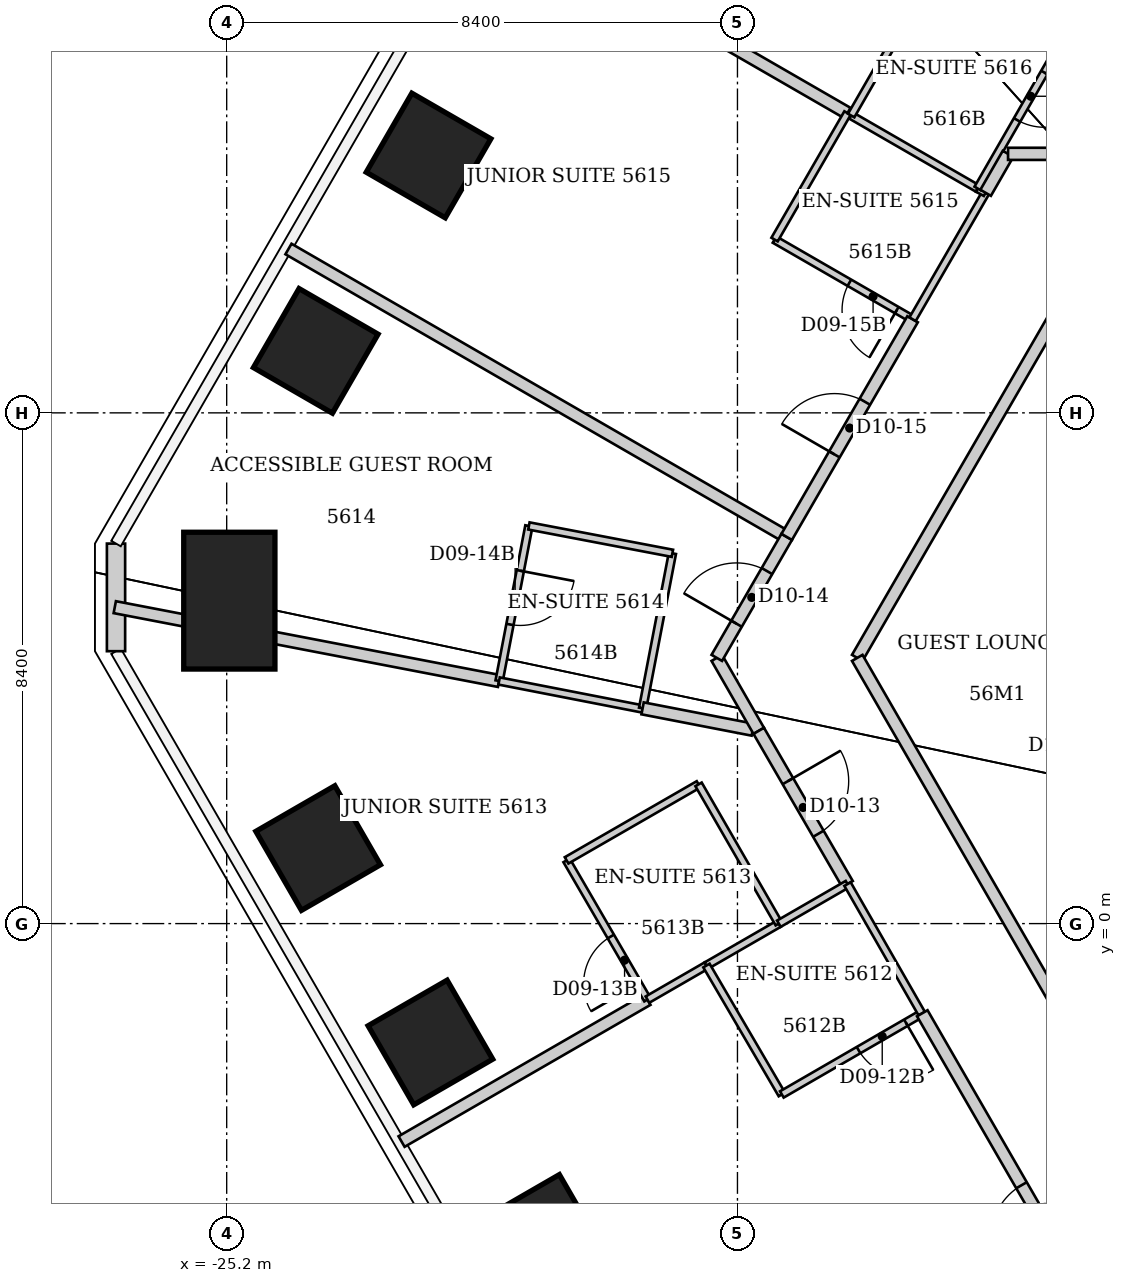
"""IFC4 building model, lengths in metres.
Left out: names, types, materials, properties, quantities, classifications, styles, units other than length and angle.
Written with IfcOpenShell. Run it as: python <this file> out.ifc"""

import sys

from ifc_helpers import new_model, si_unit, direction, frame, frame_2d, origin, origin_2d, place, context, subcontext, project, spatial, rectangle, extrude, element, fill, save


model = new_model("IFC4")
c1 = context("Model", 3, precision=1e-05, world=origin(), true_north=direction((0.0, 1.0)))
c2 = subcontext(c1, "Body", "Model", "MODEL_VIEW")
j1 = project(units=[si_unit("LENGTHUNIT", "METRE"), si_unit("PLANEANGLEUNIT", "RADIAN")], contexts=[c1])
p1 = place(None, origin())
s1 = spatial("IfcSite", under=j1, at=p1, CompositionType="ELEMENT")
p2 = place(p1, origin())
s2 = spatial("IfcBuilding", under=s1, at=p2, CompositionType="ELEMENT")
p3 = place(p2, frame((0.0, 0.0, 225.0)))
s3 = spatial("IfcBuildingStorey", under=s2, at=p3, CompositionType="ELEMENT", Elevation=225.0)
for number, where, z_axis, x_axis in (
    (1, (-20.003, -5.153, 0.0), (0.0, 0.0, 1.0), (-0.866, -0.5, 0.0)),
    (2, (-21.85, -1.956, 0.0), (0.0, 0.0, 1.0), (-0.866, -0.5, 0.0)),
    (3, (-23.696, 1.242, 0.0), (0.0, 0.0, 1.0), (-0.866, -0.5, 0.0)),
):
    element("IfcColumn", number, at=place(p3, frame(where, z_axis=z_axis, x_axis=x_axis)), inside=s3, PredefinedType="COLUMN", context=c2, shape_type="SweptSolid", body=[
        extrude(rectangle(XDim=1.5, YDim=1.5, at=origin_2d()), origin(), (0.0, 0.0, 1.0), 3.8),
    ])
p4 = place(p3, frame((-25.156, 5.311, 0.0), z_axis=(0.0, 0.0, 1.0), x_axis=(-1.0, 0.0, 0.0)))
e4 = element("IfcColumn", 4, at=p4, inside=s3, PredefinedType="COLUMN", context=c2, shape_type="SweptSolid", body=[
    extrude(rectangle(XDim=1.5, YDim=2.25, at=origin_2d()), origin(), (0.0, 0.0, 1.0), 3.8),
])
for number, where, z_axis, x_axis in (
    (5, (-23.735, 9.419, 0.0), (0.0, 0.0, 1.0), (-0.866, 0.5, 0.0)),
    (6, (-21.88, 12.633, 0.0), (0.0, 0.0, 1.0), (-0.866, 0.5, 0.0)),
):
    element("IfcColumn", number, at=place(p3, frame(where, z_axis=z_axis, x_axis=x_axis)), inside=s3, PredefinedType="COLUMN", context=c2, shape_type="SweptSolid", body=[
        extrude(rectangle(XDim=1.5, YDim=1.5, at=origin_2d()), origin(), (0.0, 0.0, 1.0), 3.8),
    ])
p5 = place(p3, frame((-27.02, 4.48, 0.0), z_axis=(0.0, 0.0, 1.0), x_axis=(0.0, 1.0, 0.0)))
e7 = element("IfcWall", 7, at=p5, inside=s3, PredefinedType="SOLIDWALL", context=c2, shape_type="SweptSolid", body=[
    extrude(rectangle(XDim=1.77, YDim=0.3, at=frame_2d((0.885, 0.0))), origin(), (0.0, 0.0, 1.0), 3.64),
])
p6 = place(p3, frame((-27.041, 5.204, 0.0), z_axis=(0.0, 0.0, 1.0), x_axis=(0.98203917013, -0.188677153703, 0.0)))
e8 = element("IfcWall", 8, at=p6, inside=s3, PredefinedType="PARTITIONING", context=c2, shape_type="SweptSolid", body=[
    extrude(rectangle(XDim=6.436, YDim=0.2, at=frame_2d((3.218, 0.0))), origin(), (0.0, 0.0, 1.0), 3.64),
])
p7 = place(p3, frame((-24.184, 11.095, 0.0), z_axis=(0.0, 0.0, 1.0), x_axis=(0.865833251631, -0.500332669702, 0.0)))
e9 = element("IfcWall", 9, at=p7, inside=s3, PredefinedType="PARTITIONING", context=c2, shape_type="SweptSolid", body=[
    extrude(rectangle(XDim=9.454, YDim=0.2, at=frame_2d((4.727, 0.0))), origin(), (0.0, 0.0, 1.0), 3.64),
])
p8 = place(p3, frame((-22.324, -3.585, 0.0), z_axis=(0.0, 0.0, 1.0), x_axis=(0.86600796803, 0.500030198396, 0.0)))
e10 = element("IfcWall", 10, at=p8, inside=s3, PredefinedType="PARTITIONING", context=c2, shape_type="SweptSolid", body=[
    extrude(rectangle(XDim=4.67, YDim=0.2, at=frame_2d((2.335, 0.0))), origin(), (0.0, 0.0, 1.0), 3.64),
])
p9 = place(p3, frame((-20.846, 16.71, 0.0), z_axis=(0.0, 0.0, 1.0), x_axis=(0.866102018567, -0.499867275818, 0.0)))
e11 = element("IfcWall", 11, at=p9, inside=s3, PredefinedType="PARTITIONING", context=c2, shape_type="SweptSolid", body=[
    extrude(rectangle(XDim=6.761, YDim=0.2, at=frame_2d((3.381, 0.0))), origin(), (0.0, 0.0, 1.0), 3.64),
])
p10 = place(p3, frame((-20.23, 6.54, 0.0), z_axis=(0.0, 0.0, 1.0), x_axis=(-0.188697442844, -0.982035271802, 0.0)))
e12 = element("IfcWall", 12, at=p10, inside=s3, PredefinedType="PARTITIONING", context=c2, shape_type="SweptSolid", body=[
    extrude(rectangle(XDim=2.597, YDim=0.12, at=frame_2d((1.298, 0.0))), origin(), (0.0, 0.0, 1.0), 3.64),
])
p11 = place(p10, frame((0.75, 0.0, 0.0)))
e13 = element("IfcOpeningElement", 13, at=p11, cuts=e12, PredefinedType="OPENING", context=c2, shape_type="SweptSolid", body=[
    extrude(rectangle(XDim=0.9, YDim=2.03, at=frame_2d((0.45, 1.015))), frame((0.0, 0.06, 0.0), z_axis=(0.0, -1.0, 0.0), x_axis=(1.0, 0.0, 0.0)), (0.0, 0.0, 1.0), 0.12),
])
p12 = place(p3, frame((-19.61, 1.04, 0.0), z_axis=(0.0, 0.0, 1.0), x_axis=(0.502242265546, -0.864726954997, 0.0)))
e14 = element("IfcWall", 14, at=p12, inside=s3, PredefinedType="PARTITIONING", context=c2, shape_type="SweptSolid", body=[
    extrude(rectangle(XDim=2.648, YDim=0.12, at=frame_2d((1.324, 0.0))), origin(), (0.0, 0.0, 1.0), 3.64),
])
p13 = place(p12, frame((1.448, 0.0, 0.0)))
e15 = element("IfcOpeningElement", 15, at=p13, cuts=e14, PredefinedType="OPENING", context=c2, shape_type="SweptSolid", body=[
    extrude(rectangle(XDim=0.9, YDim=2.03, at=frame_2d((0.45, 1.015))), frame((0.0, 0.06, 0.0), z_axis=(0.0, -1.0, 0.0), x_axis=(1.0, 0.0, 0.0)), (0.0, 0.0, 1.0), 0.12),
])
p14 = place(p3, frame((-18.36, 3.53, 0.0), z_axis=(0.0, 0.0, 1.0), x_axis=(-0.981529676402, 0.191309943135, 0.0)))
e16 = element("IfcWall", 16, at=p14, inside=s3, PredefinedType="PARTITIONING", context=c2, shape_type="SweptSolid", body=[
    extrude(rectangle(XDim=2.404, YDim=0.12, at=frame_2d((1.202, 0.0))), origin(), (0.0, 0.0, 1.0), 3.64),
])
p15 = place(p3, frame((-18.36, 3.54, 0.0), z_axis=(0.0, 0.0, 1.0), x_axis=(0.188788112352, 0.982017845375, 0.0)))
e17 = element("IfcWall", 17, at=p15, inside=s3, PredefinedType="PARTITIONING", context=c2, shape_type="SweptSolid", body=[
    extrude(rectangle(XDim=2.597, YDim=0.12, at=frame_2d((1.298, 0.0))), origin(), (0.0, 0.0, 1.0), 3.64),
])
p16 = place(p3, frame((-18.36, 3.54, 0.0), z_axis=(0.0, 0.0, 1.0), x_axis=(0.981743214677, -0.190211094409, 0.0)))
e18 = element("IfcWall", 18, at=p16, inside=s3, PredefinedType="PARTITIONING", context=c2, shape_type="SweptSolid", body=[
    extrude(rectangle(XDim=1.846, YDim=0.2, at=frame_2d((0.923, 0.0))), origin(), (0.0, 0.0, 1.0), 3.64),
])
p17 = place(p3, frame((-18.28, -1.25, 0.0), z_axis=(0.0, 0.0, 1.0), x_axis=(0.866007717299, 0.500030632641, 0.0)))
e19 = element("IfcWall", 19, at=p17, inside=s3, PredefinedType="PARTITIONING", context=c2, shape_type="SweptSolid", body=[
    extrude(rectangle(XDim=1.12, YDim=0.12, at=frame_2d((0.56, 0.0))), origin(), (0.0, 0.0, 1.0), 3.64),
])
p18 = place(p3, frame((-17.87, 6.09, 0.0), z_axis=(0.0, 0.0, 1.0), x_axis=(-0.982303859288, 0.187294228499, 0.0)))
e20 = element("IfcWall", 20, at=p18, inside=s3, PredefinedType="PARTITIONING", context=c2, shape_type="SweptSolid", body=[
    extrude(rectangle(XDim=2.402, YDim=0.12, at=frame_2d((1.201, 0.0))), origin(), (0.0, 0.0, 1.0), 3.64),
])
p19 = place(p3, frame((-17.44, 2.29, 0.0), z_axis=(0.0, 0.0, 1.0), x_axis=(-0.86653430447, -0.499117520406, 0.0)))
e21 = element("IfcWall", 21, at=p19, inside=s3, PredefinedType="PARTITIONING", context=c2, shape_type="SweptSolid", body=[
    extrude(rectangle(XDim=2.504, YDim=0.12, at=frame_2d((1.252, 0.0))), origin(), (0.0, 0.0, 1.0), 3.64),
])
p20 = place(p3, frame((-17.31, -0.69, 0.0), z_axis=(0.0, 0.0, 1.0), x_axis=(0.865940235891, 0.500147486112, 0.0)))
e22 = element("IfcWall", 22, at=p20, inside=s3, PredefinedType="PARTITIONING", context=c2, shape_type="SweptSolid", body=[
    extrude(rectangle(XDim=1.375, YDim=0.12, at=frame_2d((0.688, 0.0))), origin(), (0.0, 0.0, 1.0), 3.64),
])
p21 = place(p3, frame((-17.31, -0.69, 0.0), z_axis=(0.0, 0.0, 1.0), x_axis=(0.50485955871, -0.863201497901, 0.0)))
e23 = element("IfcWall", 23, at=p21, inside=s3, PredefinedType="PARTITIONING", context=c2, shape_type="SweptSolid", body=[
    extrude(rectangle(XDim=2.456, YDim=0.12, at=frame_2d((1.228, 0.0))), origin(), (0.0, 0.0, 1.0), 3.64),
])
p22 = place(p3, frame((-17.14, 4.37, 0.0), z_axis=(0.0, 0.0, 1.0), x_axis=(0.498378346744, -0.866959643522, 0.0)))
e24 = element("IfcWall", 24, at=p22, inside=s3, PredefinedType="PARTITIONING", context=c2, shape_type="SweptSolid", body=[
    extrude(rectangle(XDim=1.384, YDim=0.2, at=frame_2d((0.692, 0.0))), origin(), (0.0, 0.0, 1.0), 3.64),
])
p23 = place(p3, frame((-17.14, 4.37, 0.0), z_axis=(0.0, 0.0, 1.0), x_axis=(0.500320071569, 0.865840531498, 0.0)))
e25 = element("IfcWall", 25, at=p23, inside=s3, PredefinedType="PARTITIONING", context=c2, shape_type="SweptSolid", body=[
    extrude(rectangle(XDim=2.298, YDim=0.2, at=frame_2d((1.149, 0.0))), origin(), (0.0, 0.0, 1.0), 3.64),
])
p24 = place(p23, frame((0.649, 0.0, 0.0)))
e26 = element("IfcOpeningElement", 26, at=p24, cuts=e25, PredefinedType="OPENING", context=c2, shape_type="SweptSolid", body=[
    extrude(rectangle(XDim=1.0, YDim=2.13, at=frame_2d((0.5, 1.065))), frame((0.0, 0.1, 0.0), z_axis=(0.0, -1.0, 0.0), x_axis=(1.0, 0.0, 0.0)), (0.0, 0.0, 1.0), 0.2),
])
p25 = place(p3, frame((-16.45, 3.17, 0.0), z_axis=(0.0, 0.0, 1.0), x_axis=(0.501293994647, -0.865277025542, 0.0)))
e27 = element("IfcWall", 27, at=p25, inside=s3, PredefinedType="PARTITIONING", context=c2, shape_type="SweptSolid", body=[
    extrude(rectangle(XDim=2.912, YDim=0.2, at=frame_2d((1.456, 0.0))), origin(), (0.0, 0.0, 1.0), 3.64),
])
p26 = place(p25, frame((0.956, 0.0, 0.0)))
e28 = element("IfcOpeningElement", 28, at=p26, cuts=e27, PredefinedType="OPENING", context=c2, shape_type="SweptSolid", body=[
    extrude(rectangle(XDim=1.0, YDim=2.13, at=frame_2d((0.5, 1.065))), frame((0.0, 0.1, 0.0), z_axis=(0.0, -1.0, 0.0), x_axis=(1.0, 0.0, 0.0)), (0.0, 0.0, 1.0), 0.2),
])
p27 = place(p3, frame((-16.19, 11.25, 0.0), z_axis=(0.0, 0.0, 1.0), x_axis=(0.866114241029, -0.499846097802, 0.0)))
e29 = element("IfcWall", 29, at=p27, inside=s3, PredefinedType="PARTITIONING", context=c2, shape_type="SweptSolid", body=[
    extrude(rectangle(XDim=2.621, YDim=0.12, at=frame_2d((1.311, 0.0))), origin(), (0.0, 0.0, 1.0), 3.64),
])
p28 = place(p27, frame((1.421, 0.0, 0.0)))
e30 = element("IfcOpeningElement", 30, at=p28, cuts=e29, PredefinedType="OPENING", context=c2, shape_type="SweptSolid", body=[
    extrude(rectangle(XDim=0.9, YDim=2.03, at=frame_2d((0.45, 1.015))), frame((0.0, 0.06, 0.0), z_axis=(0.0, -1.0, 0.0), x_axis=(1.0, 0.0, 0.0)), (0.0, 0.0, 1.0), 0.12),
])
p29 = place(p3, frame((-16.12, 0.0, 0.0), z_axis=(0.0, 0.0, 1.0), x_axis=(-0.499338582192, 0.866406936915, 0.0)))
e31 = element("IfcWall", 31, at=p29, inside=s3, PredefinedType="PARTITIONING", context=c2, shape_type="SweptSolid", body=[
    extrude(rectangle(XDim=2.643, YDim=0.12, at=frame_2d((1.322, 0.0))), origin(), (0.0, 0.0, 1.0), 3.64),
])
p30 = place(p3, frame((-16.119, -0.002, 0.0), z_axis=(0.0, 0.0, 1.0), x_axis=(0.865998449813, 0.500046682742, 0.0)))
e32 = element("IfcWall", 32, at=p30, inside=s3, PredefinedType="PARTITIONING", context=c2, shape_type="SweptSolid", body=[
    extrude(rectangle(XDim=1.304, YDim=0.12, at=frame_2d((0.652, 0.0))), origin(), (0.0, 0.0, 1.0), 3.64),
])
p31 = place(p3, frame((-16.07, -2.81, 0.0), z_axis=(0.0, 0.0, 1.0), x_axis=(0.865675724273, 0.500605174168, 0.0)))
e33 = element("IfcWall", 33, at=p31, inside=s3, PredefinedType="PARTITIONING", context=c2, shape_type="SweptSolid", body=[
    extrude(rectangle(XDim=2.657, YDim=0.12, at=frame_2d((1.329, 0.0))), origin(), (0.0, 0.0, 1.0), 3.023),
])
p32 = place(p31, frame((1.457, 0.0, 0.0)))
e34 = element("IfcOpeningElement", 34, at=p32, cuts=e33, PredefinedType="OPENING", context=c2, shape_type="SweptSolid", body=[
    extrude(rectangle(XDim=0.9, YDim=2.03, at=frame_2d((0.45, 1.015))), frame((0.0, 0.06, 0.0), z_axis=(0.0, -1.0, 0.0), x_axis=(1.0, 0.0, 0.0)), (0.0, 0.0, 1.0), 0.12),
])
p33 = place(p3, frame((-15.99, 6.36, 0.0), z_axis=(0.0, 0.0, 1.0), x_axis=(0.500589371231, 0.865684862644, 0.0)))
e35 = element("IfcWall", 35, at=p33, inside=s3, PredefinedType="PARTITIONING", context=c2, shape_type="SweptSolid", body=[
    extrude(rectangle(XDim=4.135, YDim=0.2, at=frame_2d((2.068, 0.0))), origin(), (0.0, 0.0, 1.0), 3.64),
])
p34 = place(p33, frame((1.568, 0.0, 0.0)))
e36 = element("IfcOpeningElement", 36, at=p34, cuts=e35, PredefinedType="OPENING", context=c2, shape_type="SweptSolid", body=[
    extrude(rectangle(XDim=1.0, YDim=2.13, at=frame_2d((0.5, 1.065))), frame((0.0, 0.1, 0.0), z_axis=(0.0, -1.0, 0.0), x_axis=(1.0, 0.0, 0.0)), (0.0, 0.0, 1.0), 0.2),
])
p35 = place(p3, frame((-14.99, 0.65, 0.0), z_axis=(0.0, 0.0, 1.0), x_axis=(0.497027744361, -0.86773464915, 0.0)))
e37 = element("IfcWall", 37, at=p35, inside=s3, PredefinedType="PARTITIONING", context=c2, shape_type="SweptSolid", body=[
    extrude(rectangle(XDim=2.455, YDim=0.12, at=frame_2d((1.227, 0.0))), origin(), (0.0, 0.0, 1.0), 3.64),
])
p36 = place(p3, frame((-14.99, 13.33, 0.0), z_axis=(0.0, 0.0, 1.0), x_axis=(-0.499693115345, -0.866202511239, 0.0)))
e38 = element("IfcWall", 38, at=p36, inside=s3, PredefinedType="PARTITIONING", context=c2, shape_type="SweptSolid", body=[
    extrude(rectangle(XDim=2.401, YDim=0.12, at=frame_2d((1.201, 0.0))), origin(), (0.0, 0.0, 1.0), 3.64),
])
p37 = place(p3, frame((-14.93, 13.29, 0.0), z_axis=(0.0, 0.0, 1.0), x_axis=(0.866177122335, -0.499737123639, 0.0)))
e39 = element("IfcWall", 39, at=p37, inside=s3, PredefinedType="PARTITIONING", context=c2, shape_type="SweptSolid", body=[
    extrude(rectangle(XDim=2.401, YDim=0.12, at=frame_2d((1.201, 0.0))), origin(), (0.0, 0.0, 1.0), 3.64),
])
p38 = place(p3, frame((-14.83, 4.37, 0.0), z_axis=(0.0, 0.0, 1.0), x_axis=(0.500899863475, 0.865505243642, 0.0)))
e40 = element("IfcWall", 40, at=p38, inside=s3, PredefinedType="PARTITIONING", context=c2, shape_type="SweptSolid", body=[
    extrude(rectangle(XDim=7.267, YDim=0.2, at=frame_2d((3.634, 0.0))), origin(), (0.0, 0.0, 1.0), 3.64),
])
p39 = place(p3, frame((-13.92, 9.94, 0.0), z_axis=(0.0, 0.0, 1.0), x_axis=(0.500402934999, 0.865792644139, 0.0)))
e41 = element("IfcWall", 41, at=p39, inside=s3, PredefinedType="PARTITIONING", context=c2, shape_type="SweptSolid", body=[
    extrude(rectangle(XDim=2.401, YDim=0.12, at=frame_2d((1.201, 0.0))), origin(), (0.0, 0.0, 1.0), 3.64),
])
p40 = place(p3, frame((-13.63, 15.55, 0.0), z_axis=(0.0, 0.0, 1.0), x_axis=(-0.498627694264, -0.866816256489, 0.0)))
e42 = element("IfcWall", 42, at=p40, inside=s3, PredefinedType="PARTITIONING", context=c2, shape_type="SweptSolid", body=[
    extrude(rectangle(XDim=2.607, YDim=0.12, at=frame_2d((1.304, 0.0))), origin(), (0.0, 0.0, 1.0), 3.64),
])
p41 = place(p3, frame((-12.85, 12.09, 0.0), z_axis=(0.0, 0.0, 1.0), x_axis=(0.880471099922, -0.474099823035, 0.0)))
e43 = element("IfcWall", 43, at=p41, inside=s3, PredefinedType="PARTITIONING", context=c2, shape_type="SweptSolid", body=[
    extrude(rectangle(XDim=0.148, YDim=0.12, at=frame_2d((0.074, 0.0))), origin(), (0.0, 0.0, 1.0), 3.64),
])
p42 = place(p3, frame((-12.85, 12.09, 0.0), z_axis=(0.0, 0.0, 1.0), x_axis=(0.498627694264, 0.866816256489, 0.0)))
e44 = element("IfcWall", 44, at=p42, inside=s3, PredefinedType="PARTITIONING", context=c2, shape_type="SweptSolid", body=[
    extrude(rectangle(XDim=2.607, YDim=0.12, at=frame_2d((1.304, 0.0))), origin(), (0.0, 0.0, 1.0), 3.64),
])
p43 = place(p42, frame((1.3, 0.0, 0.0)))
e45 = element("IfcOpeningElement", 45, at=p43, cuts=e44, PredefinedType="OPENING", context=c2, shape_type="SweptSolid", body=[
    extrude(rectangle(XDim=0.9, YDim=2.03, at=frame_2d((0.45, 1.015))), frame((0.0, 0.06, 0.0), z_axis=(0.0, -1.0, 0.0), x_axis=(1.0, 0.0, 0.0)), (0.0, 0.0, 1.0), 0.12),
])
p44 = place(p3, frame((-12.718, 12.019, 0.0), z_axis=(0.0, 0.0, 1.0), x_axis=(0.498129744856, 0.867102506795, 0.0)))
e46 = element("IfcWall", 46, at=p44, inside=s3, PredefinedType="PARTITIONING", context=c2, shape_type="SweptSolid", body=[
    extrude(rectangle(XDim=0.739, YDim=0.2, at=frame_2d((0.37, 0.0))), origin(), (0.0, 0.0, 1.0), 3.64),
])
p45 = place(p3, frame((-11.55, 14.35, 0.0), z_axis=(0.0, 0.0, 1.0), x_axis=(-0.866177122335, 0.499737123639, 0.0)))
e47 = element("IfcWall", 47, at=p45, inside=s3, PredefinedType="PARTITIONING", context=c2, shape_type="SweptSolid", body=[
    extrude(rectangle(XDim=2.401, YDim=0.12, at=frame_2d((1.201, 0.0))), origin(), (0.0, 0.0, 1.0), 3.64),
])
p46 = place(p3, frame((-10.647, -2.881, 0.0), z_axis=(0.0, 0.0, 1.0), x_axis=(-0.499665221769, 0.866218601829, 0.0)))
e48 = element("IfcWall", 48, at=p46, inside=s3, PredefinedType="PARTITIONING", context=c2, shape_type="SweptSolid", body=[
    extrude(rectangle(XDim=8.371, YDim=0.2, at=frame_2d((4.186, 0.0))), origin(), (0.0, 0.0, 1.0), 3.64),
])
p47 = place(p3, frame((-9.997, -7.998, 0.0), z_axis=(0.0, 0.0, 1.0), x_axis=(-0.499699067435, 0.866199077582, 0.0)))
e49 = element("IfcWall", 49, at=p47, inside=s3, PredefinedType="PARTITIONING", context=c2, shape_type="SweptSolid", body=[
    extrude(rectangle(XDim=7.531, YDim=0.2, at=frame_2d((3.766, 0.0))), origin(), (0.0, 0.0, 1.0), 3.64),
])
p48 = place(p47, frame((3.266, 0.0, 0.0)))
e50 = element("IfcOpeningElement", 50, at=p48, cuts=e49, PredefinedType="OPENING", context=c2, shape_type="SweptSolid", body=[
    extrude(rectangle(XDim=1.0, YDim=2.13, at=frame_2d((0.5, 1.065))), frame((0.0, 0.1, 0.0), z_axis=(0.0, -1.0, 0.0), x_axis=(1.0, 0.0, 0.0)), (0.0, 0.0, 1.0), 0.2),
])
p49 = place(p3, frame((-9.66, 12.66, 0.0), z_axis=(0.0, 0.0, 1.0), x_axis=(-1.0, 0.0, 0.0)))
e51 = element("IfcWall", 51, at=p49, inside=s3, PredefinedType="PARTITIONING", context=c2, shape_type="SweptSolid", body=[
    extrude(rectangle(XDim=2.69, YDim=0.2, at=frame_2d((1.345, 0.0))), origin(), (0.0, 0.0, 1.0), 3.64),
])
p50 = place(p49, frame((0.845, 0.0, 0.0)))
e52 = element("IfcOpeningElement", 52, at=p50, cuts=e51, PredefinedType="OPENING", context=c2, shape_type="SweptSolid", body=[
    extrude(rectangle(XDim=1.0, YDim=2.13, at=frame_2d((0.5, 1.065))), frame((0.0, 0.1, 0.0), z_axis=(0.0, -1.0, 0.0), x_axis=(1.0, 0.0, 0.0)), (0.0, 0.0, 1.0), 0.2),
])
p51 = place(p48, origin())
e53 = element("IfcDoor", 53, at=p51, inside=s3, OperationType="SINGLE_SWING_LEFT", PredefinedType="DOOR", context=c2, shape_type="SweptSolid", body=[
    extrude(rectangle(XDim=1.0, YDim=2.13, at=frame_2d((0.5, 1.065))), frame((0.0, 0.025, 0.0), z_axis=(0.0, -1.0, 0.0), x_axis=(1.0, 0.0, 0.0)), (0.0, 0.0, 1.0), 0.05),
])
fill(e50, e53)
p52 = place(p32, origin())
e54 = element("IfcDoor", 54, at=p52, inside=s3, OperationType="SINGLE_SWING_RIGHT", PredefinedType="DOOR", context=c2, shape_type="SweptSolid", body=[
    extrude(rectangle(XDim=0.9, YDim=2.03, at=frame_2d((0.45, 1.015))), frame((0.0, 0.025, 0.0), z_axis=(0.0, -1.0, 0.0), x_axis=(1.0, 0.0, 0.0)), (0.0, 0.0, 1.0), 0.05),
])
fill(e34, e54)
p53 = place(p26, origin())
e55 = element("IfcDoor", 55, at=p53, inside=s3, OperationType="SINGLE_SWING_LEFT", PredefinedType="DOOR", context=c2, shape_type="SweptSolid", body=[
    extrude(rectangle(XDim=1.0, YDim=2.13, at=frame_2d((0.5, 1.065))), frame((0.0, 0.025, 0.0), z_axis=(0.0, -1.0, 0.0), x_axis=(1.0, 0.0, 0.0)), (0.0, 0.0, 1.0), 0.05),
])
fill(e28, e55)
p54 = place(p13, origin())
e56 = element("IfcDoor", 56, at=p54, inside=s3, OperationType="SINGLE_SWING_RIGHT", PredefinedType="DOOR", context=c2, shape_type="SweptSolid", body=[
    extrude(rectangle(XDim=0.9, YDim=2.03, at=frame_2d((0.45, 1.015))), frame((0.0, 0.025, 0.0), z_axis=(0.0, -1.0, 0.0), x_axis=(1.0, 0.0, 0.0)), (0.0, 0.0, 1.0), 0.05),
])
fill(e15, e56)
p55 = place(p24, origin())
e57 = element("IfcDoor", 57, at=p55, inside=s3, OperationType="SINGLE_SWING_LEFT", PredefinedType="DOOR", context=c2, shape_type="SweptSolid", body=[
    extrude(rectangle(XDim=1.0, YDim=2.13, at=frame_2d((0.5, 1.065))), frame((0.0, 0.025, 0.0), z_axis=(0.0, -1.0, 0.0), x_axis=(1.0, 0.0, 0.0)), (0.0, 0.0, 1.0), 0.05),
])
fill(e26, e57)
p56 = place(p11, origin())
e58 = element("IfcDoor", 58, at=p56, inside=s3, OperationType="SINGLE_SWING_LEFT", PredefinedType="DOOR", context=c2, shape_type="SweptSolid", body=[
    extrude(rectangle(XDim=0.9, YDim=2.03, at=frame_2d((0.45, 1.015))), frame((0.0, 0.025, 0.0), z_axis=(0.0, -1.0, 0.0), x_axis=(1.0, 0.0, 0.0)), (0.0, 0.0, 1.0), 0.05),
])
fill(e13, e58)
p57 = place(p34, origin())
e59 = element("IfcDoor", 59, at=p57, inside=s3, OperationType="SINGLE_SWING_LEFT", PredefinedType="DOOR", context=c2, shape_type="SweptSolid", body=[
    extrude(rectangle(XDim=1.0, YDim=2.13, at=frame_2d((0.5, 1.065))), frame((0.0, 0.025, 0.0), z_axis=(0.0, -1.0, 0.0), x_axis=(1.0, 0.0, 0.0)), (0.0, 0.0, 1.0), 0.05),
])
fill(e36, e59)
p58 = place(p28, origin())
e60 = element("IfcDoor", 60, at=p58, inside=s3, OperationType="SINGLE_SWING_RIGHT", PredefinedType="DOOR", context=c2, shape_type="SweptSolid", body=[
    extrude(rectangle(XDim=0.9, YDim=2.03, at=frame_2d((0.45, 1.015))), frame((0.0, 0.025, 0.0), z_axis=(0.0, -1.0, 0.0), x_axis=(1.0, 0.0, 0.0)), (0.0, 0.0, 1.0), 0.05),
])
fill(e30, e60)
p59 = place(p43, origin())
e61 = element("IfcDoor", 61, at=p59, inside=s3, OperationType="SINGLE_SWING_RIGHT", PredefinedType="DOOR", context=c2, shape_type="SweptSolid", body=[
    extrude(rectangle(XDim=0.9, YDim=2.03, at=frame_2d((0.45, 1.015))), frame((0.0, 0.025, 0.0), z_axis=(0.0, -1.0, 0.0), x_axis=(1.0, 0.0, 0.0)), (0.0, 0.0, 1.0), 0.05),
])
fill(e45, e61)
save(model, sys.argv[1])
